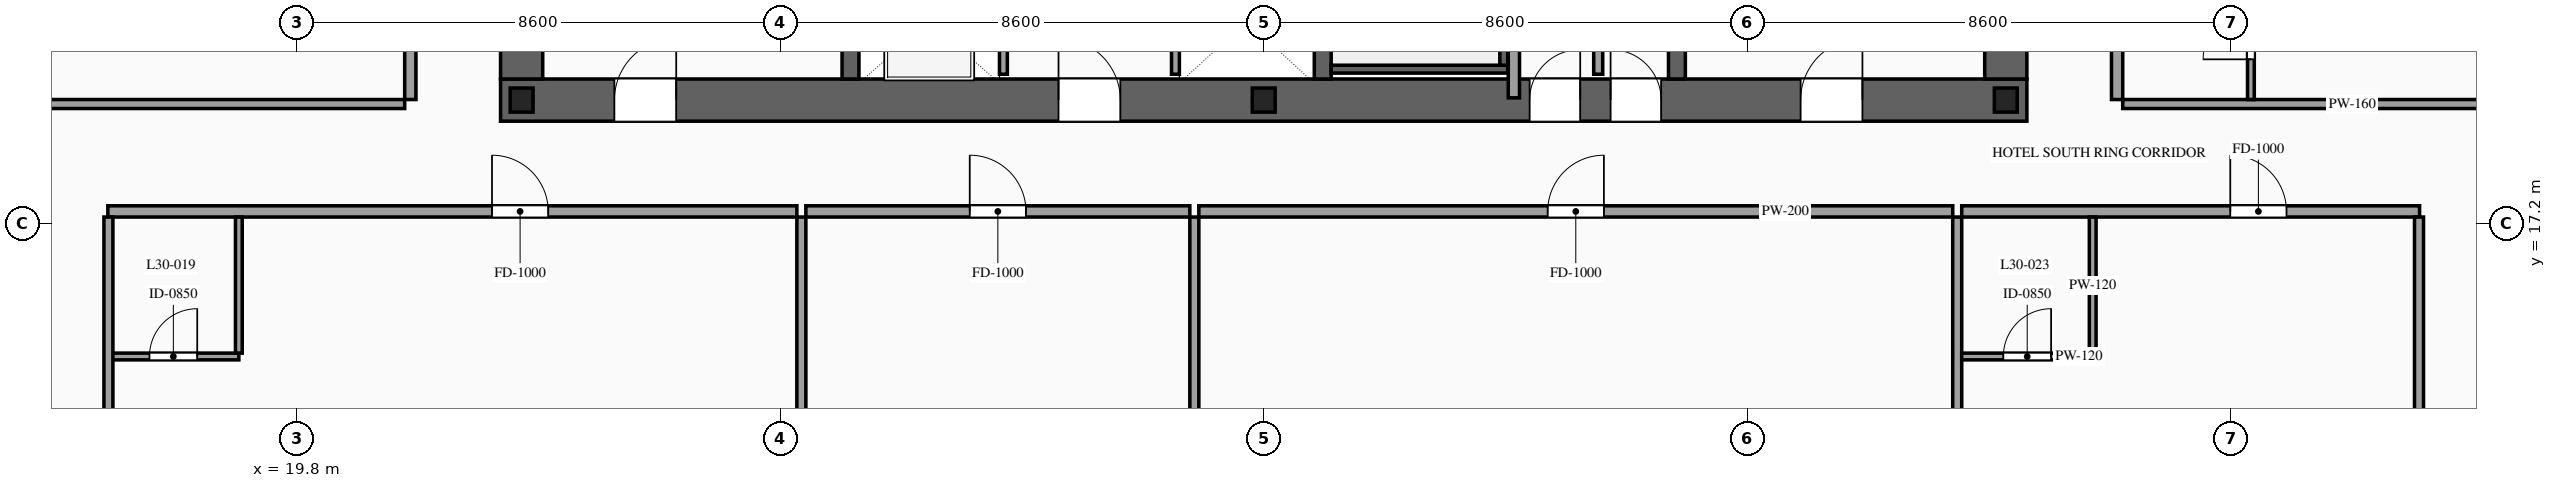
"""IFC4 building model, lengths in metres.
Left out: names, types, materials, properties, quantities, classifications, styles, units other than length and angle.
Written with IfcOpenShell. Run it as: python <this file> out.ifc"""

import sys

from ifc_helpers import new_model, si_unit, direction, frame, frame_2d, origin, origin_2d, place, context, subcontext, project, spatial, rectangle, i_section, extrude, source, transform, mapped, element, fill, save


model = new_model("IFC4")
c1 = context("Model", 3, precision=1e-05, world=origin(), true_north=direction((0.0, 1.0)))
c2 = subcontext(c1, "Body", "Model", "MODEL_VIEW")
j1 = project(units=[si_unit("LENGTHUNIT", "METRE"), si_unit("PLANEANGLEUNIT", "RADIAN")], contexts=[c1])
p1 = place(None, origin())
s1 = spatial("IfcSite", under=j1, at=p1, CompositionType="ELEMENT")
p2 = place(p1, origin())
s2 = spatial("IfcBuilding", under=s1, at=p2, CompositionType="ELEMENT")
p3 = place(p2, frame((0.0, 0.0, 115.4)))
s3 = spatial("IfcBuildingStorey", under=s2, at=p3, CompositionType="ELEMENT", Elevation=115.4)
p4 = place(p3, frame((23.425, 19.4, 0.0), z_axis=(0.0, 0.0, 1.0), x_axis=(1.0, 0.0, 0.0)))
e1 = element("IfcWall", 1, at=p4, inside=s3, PredefinedType="SHEAR", context=c2, shape_type="SweptSolid", body=[
    extrude(rectangle(XDim=27.15, YDim=0.75, at=frame_2d((13.575, 0.0))), origin(), (0.0, 0.0, 1.0), 3.6),
])
p5 = place(p4, frame((2.025, 0.0, 0.0)))
e2 = element("IfcOpeningElement", 2, at=p5, cuts=e1, PredefinedType="OPENING", context=c2, shape_type="SweptSolid", body=[
    extrude(rectangle(XDim=1.1, YDim=2.2, at=frame_2d((0.55, 1.1))), frame((0.0, 0.39, 0.0), z_axis=(0.0, -1.0, 0.0), x_axis=(1.0, 0.0, 0.0)), (0.0, 0.0, 1.0), 0.78),
])
p6 = place(p4, frame((9.925, 0.0, 0.0)))
e3 = element("IfcOpeningElement", 3, at=p6, cuts=e1, PredefinedType="OPENING", context=c2, shape_type="SweptSolid", body=[
    extrude(rectangle(XDim=1.1, YDim=2.2, at=frame_2d((0.55, 1.1))), frame((0.0, 0.39, 0.0), z_axis=(0.0, -1.0, 0.0), x_axis=(1.0, 0.0, 0.0)), (0.0, 0.0, 1.0), 0.78),
])
p7 = place(p4, frame((23.125, 0.0, 0.0)))
e4 = element("IfcOpeningElement", 4, at=p7, cuts=e1, PredefinedType="OPENING", context=c2, shape_type="SweptSolid", body=[
    extrude(rectangle(XDim=1.1, YDim=2.2, at=frame_2d((0.55, 1.1))), frame((0.0, 0.39, 0.0), z_axis=(0.0, -1.0, 0.0), x_axis=(1.0, 0.0, 0.0)), (0.0, 0.0, 1.0), 0.78),
])
p8 = place(p4, frame((19.745, 0.0, 0.0)))
e5 = element("IfcOpeningElement", 5, at=p8, cuts=e1, PredefinedType="OPENING", context=c2, shape_type="SweptSolid", body=[
    extrude(rectangle(XDim=0.9, YDim=2.15, at=frame_2d((0.45, 1.075))), frame((0.0, 0.39, 0.0), z_axis=(0.0, -1.0, 0.0), x_axis=(1.0, 0.0, 0.0)), (0.0, 0.0, 1.0), 0.78),
])
p9 = place(p4, frame((18.305, 0.0, 0.0)))
e6 = element("IfcOpeningElement", 6, at=p9, cuts=e1, PredefinedType="OPENING", context=c2, shape_type="SweptSolid", body=[
    extrude(rectangle(XDim=0.9, YDim=2.15, at=frame_2d((0.45, 1.075))), frame((0.0, 0.39, 0.0), z_axis=(0.0, -1.0, 0.0), x_axis=(1.0, 0.0, 0.0)), (0.0, 0.0, 1.0), 0.78),
])
m1 = source(origin(), c2, "Body", "SweptSolid", [
    extrude(rectangle(XDim=12.05, YDim=0.75, at=frame_2d((6.025, 0.0))), origin(), (0.0, 0.0, 1.0), 3.6),
])
for number, where, z_axis, x_axis in (
    (7, (23.8, 19.775, 0.0), (0.0, 0.0, 1.0), (0.0, 1.0, 0.0)),
    (8, (50.2, 19.775, 0.0), (0.0, 0.0, 1.0), (0.0, 1.0, 0.0)),
):
    element("IfcWall", number, at=place(p3, frame(where, z_axis=z_axis, x_axis=x_axis)), inside=s3, PredefinedType="SHEAR", context=c2, shape_type="MappedRepresentation", body=[
        mapped(m1, transform((0.0, 0.0, 0.0), scale=1.0)),
    ])
m2 = source(origin(), c2, "Body", "SweptSolid", [
    extrude(rectangle(XDim=12.05, YDim=0.3, at=frame_2d((6.025, 0.0))), origin(), (0.0, 0.0, 1.0), 3.6),
])
for number, where, z_axis, x_axis in (
    (9, (29.65, 19.775, 0.0), (0.0, 0.0, 1.0), (0.0, 1.0, 0.0)),
    (10, (38.05, 19.775, 0.0), (0.0, 0.0, 1.0), (0.0, 1.0, 0.0)),
    (11, (44.35, 19.775, 0.0), (0.0, 0.0, 1.0), (0.0, 1.0, 0.0)),
):
    element("IfcWall", number, at=place(p3, frame(where, z_axis=z_axis, x_axis=x_axis)), inside=s3, PredefinedType="SOLIDWALL", context=c2, shape_type="MappedRepresentation", body=[
        mapped(m2, transform((0.0, 0.0, 0.0), scale=1.0)),
    ])
m3 = source(origin(), c2, "Body", "SweptSolid", [
    extrude(i_section(OverallWidth=0.407, OverallDepth=0.428, WebThickness=0.02, FlangeThickness=0.035, at=origin_2d()), origin(), (0.0, 0.0, 1.0), 3.6),
])
for number, where, z_axis, x_axis in (
    (12, (23.8, 19.4, 0.0), (0.0, 0.0, 1.0), (1.0, 0.0, 0.0)),
    (13, (37.0, 19.4, 0.0), (0.0, 0.0, 1.0), (1.0, 0.0, 0.0)),
    (14, (50.2, 19.4, 0.0), (0.0, 0.0, 1.0), (1.0, 0.0, 0.0)),
):
    element("IfcColumn", number, at=place(p3, frame(where, z_axis=z_axis, x_axis=x_axis)), inside=s3, PredefinedType="COLUMN", context=c2, shape_type="MappedRepresentation", body=[
        mapped(m3, transform((0.0, 0.0, 0.0), scale=1.0)),
    ])
p10 = place(p3, frame((32.37, 19.86, 0.0), z_axis=(0.0, 0.0, 1.0), x_axis=(0.0, 1.0, 0.0)))
e15 = element("IfcWall", 15, at=p10, inside=s3, PredefinedType="SOLIDWALL", context=c2, shape_type="SweptSolid", body=[
    extrude(rectangle(XDim=2.04, YDim=0.14, at=frame_2d((1.02, 0.0))), origin(), (0.0, 0.0, 1.0), 3.38),
])
p11 = place(p10, frame((0.47, 0.0, 0.0)))
e16 = element("IfcOpeningElement", 16, at=p11, cuts=e15, PredefinedType="OPENING", context=c2, shape_type="SweptSolid", body=[
    extrude(rectangle(XDim=1.1, YDim=2.2, at=frame_2d((0.55, 1.1))), frame((0.0, 0.085, 0.0), z_axis=(0.0, -1.0, 0.0), x_axis=(1.0, 0.0, 0.0)), (0.0, 0.0, 1.0), 0.17),
])
m4 = source(origin(), c2, "Body", "SweptSolid", [
    extrude(rectangle(XDim=2.04, YDim=0.14, at=frame_2d((1.02, 0.0))), origin(), (0.0, 0.0, 1.0), 3.38),
])
p12 = place(p3, frame((35.43, 19.86, 0.0), z_axis=(0.0, 0.0, 1.0), x_axis=(0.0, 1.0, 0.0)))
e17 = element("IfcWall", 17, at=p12, inside=s3, PredefinedType="SOLIDWALL", context=c2, shape_type="MappedRepresentation", body=[
    mapped(m4, transform((0.0, 0.0, 0.0), scale=1.0)),
])
m5 = source(origin(), c2, "Body", "SweptSolid", [
    extrude(rectangle(XDim=3.14, YDim=0.14, at=frame_2d((1.57, 0.0))), origin(), (0.0, 0.0, 1.0), 3.38),
])
p13 = place(p3, frame((38.2, 19.95, 0.0), z_axis=(0.0, 0.0, 1.0), x_axis=(1.0, 0.0, 0.0)))
e18 = element("IfcWall", 18, at=p13, inside=s3, PredefinedType="SOLIDWALL", context=c2, shape_type="MappedRepresentation", body=[
    mapped(m5, transform((0.0, 0.0, 0.0), scale=1.0)),
])
m6 = source(origin(), c2, "Body", "SweptSolid", [
    extrude(rectangle(XDim=8.94, YDim=0.14, at=frame_2d((4.47, 0.0))), origin(), (0.0, 0.0, 1.0), 3.38),
])
p14 = place(p3, frame((41.27, 20.02, 0.0), z_axis=(0.0, 0.0, 1.0), x_axis=(0.0, 1.0, 0.0)))
e19 = element("IfcWall", 19, at=p14, inside=s3, PredefinedType="SOLIDWALL", context=c2, shape_type="MappedRepresentation", body=[
    mapped(m6, transform((0.0, 0.0, 0.0), scale=1.0)),
])
m7 = source(origin(), c2, "Body", "SweptSolid", [
    extrude(rectangle(XDim=1.34, YDim=0.16, at=frame_2d((0.67, 0.0))), origin(), (0.0, 0.0, 1.0), 3.38),
])
p15 = place(p3, frame((42.95, 19.86, 0.0), z_axis=(0.0, 0.0, 1.0), x_axis=(0.0, 1.0, 0.0)))
e20 = element("IfcWall", 20, at=p15, inside=s3, PredefinedType="PARTITIONING", context=c2, shape_type="MappedRepresentation", body=[
    mapped(m7, transform((0.0, 0.0, 0.0), scale=1.0)),
])
m8 = source(origin(), c2, "Body", "SweptSolid", [
    extrude(rectangle(XDim=6.51, YDim=0.2, at=frame_2d((3.255, 0.0))), origin(), (0.0, 0.0, 1.0), 3.38),
])
p16 = place(p3, frame((41.45, 19.44, 0.0), z_axis=(0.0, 0.0, 1.0), x_axis=(0.0, 1.0, 0.0)))
e21 = element("IfcWall", 21, at=p16, inside=s3, PredefinedType="PARTITIONING", context=c2, shape_type="MappedRepresentation", body=[
    mapped(m8, transform((0.0, 0.0, 0.0), scale=1.0)),
])
p17 = place(p3, frame((16.44, 17.42, 0.0), z_axis=(0.0, 0.0, 1.0), x_axis=(1.0, 0.0, 0.0)))
e22 = element("IfcWall", 22, at=p17, inside=s3, PredefinedType="PARTITIONING", context=c2, shape_type="SweptSolid", body=[
    extrude(rectangle(XDim=12.256, YDim=0.2, at=frame_2d((6.128, 0.0))), origin(), (0.0, 0.0, 1.0), 3.38),
])
p18 = place(p17, frame((6.833, 0.0, 0.0)))
e23 = element("IfcOpeningElement", 23, at=p18, cuts=e22, PredefinedType="OPENING", context=c2, shape_type="SweptSolid", body=[
    extrude(rectangle(XDim=1.0, YDim=2.2, at=frame_2d((0.5, 1.1))), frame((0.0, 0.115, 0.0), z_axis=(0.0, -1.0, 0.0), x_axis=(1.0, 0.0, 0.0)), (0.0, 0.0, 1.0), 0.23),
])
m9 = source(origin(), c2, "Body", "SweptSolid", [
    extrude(rectangle(XDim=14.97, YDim=0.16, at=frame_2d((7.485, 0.0))), origin(), (0.0, 0.0, 1.0), 3.38),
])
p19 = place(p3, frame((28.776, 2.35, 0.0), z_axis=(0.0, 0.0, 1.0), x_axis=(0.0, 1.0, 0.0)))
e24 = element("IfcWall", 24, at=p19, inside=s3, PredefinedType="PARTITIONING", context=c2, shape_type="MappedRepresentation", body=[
    mapped(m9, transform((0.0, 0.0, 0.0), scale=1.0)),
])
p20 = place(p3, frame((16.44, 14.84, 0.0), z_axis=(0.0, 0.0, 1.0), x_axis=(1.0, 0.0, 0.0)))
e25 = element("IfcWall", 25, at=p20, inside=s3, PredefinedType="PARTITIONING", context=c2, shape_type="SweptSolid", body=[
    extrude(rectangle(XDim=2.33, YDim=0.12, at=frame_2d((1.165, 0.0))), origin(), (0.0, 0.0, 1.0), 3.38),
])
p21 = place(p20, frame((0.74, 0.0, 0.0)))
e26 = element("IfcOpeningElement", 26, at=p21, cuts=e25, PredefinedType="OPENING", context=c2, shape_type="SweptSolid", body=[
    extrude(rectangle(XDim=0.85, YDim=2.1, at=frame_2d((0.425, 1.05))), frame((0.0, 0.075, 0.0), z_axis=(0.0, -1.0, 0.0), x_axis=(1.0, 0.0, 0.0)), (0.0, 0.0, 1.0), 0.15),
])
m10 = source(origin(), c2, "Body", "SweptSolid", [
    extrude(rectangle(XDim=2.42, YDim=0.12, at=frame_2d((1.21, 0.0))), origin(), (0.0, 0.0, 1.0), 3.38),
])
p22 = place(p3, frame((18.77, 14.9, 0.0), z_axis=(0.0, 0.0, 1.0), x_axis=(0.0, 1.0, 0.0)))
e27 = element("IfcWall", 27, at=p22, inside=s3, PredefinedType="PARTITIONING", context=c2, shape_type="MappedRepresentation", body=[
    mapped(m10, transform((0.0, 0.0, 0.0), scale=1.0)),
])
p23 = place(p3, frame((28.856, 17.42, 0.0), z_axis=(0.0, 0.0, 1.0), x_axis=(1.0, 0.0, 0.0)))
e28 = element("IfcWall", 28, at=p23, inside=s3, PredefinedType="PARTITIONING", context=c2, shape_type="SweptSolid", body=[
    extrude(rectangle(XDim=6.83, YDim=0.2, at=frame_2d((3.415, 0.0))), origin(), (0.0, 0.0, 1.0), 3.38),
])
p24 = place(p23, frame((2.915, 0.0, 0.0)))
e29 = element("IfcOpeningElement", 29, at=p24, cuts=e28, PredefinedType="OPENING", context=c2, shape_type="SweptSolid", body=[
    extrude(rectangle(XDim=1.0, YDim=2.2, at=frame_2d((0.5, 1.1))), frame((0.0, 0.115, 0.0), z_axis=(0.0, -1.0, 0.0), x_axis=(1.0, 0.0, 0.0)), (0.0, 0.0, 1.0), 0.23),
])
p25 = place(p3, frame((35.766, 2.35, 0.0), z_axis=(0.0, 0.0, 1.0), x_axis=(0.0, 1.0, 0.0)))
e30 = element("IfcWall", 30, at=p25, inside=s3, PredefinedType="PARTITIONING", context=c2, shape_type="MappedRepresentation", body=[
    mapped(m9, transform((0.0, 0.0, 0.0), scale=1.0)),
])
p26 = place(p3, frame((35.846, 17.42, 0.0), z_axis=(0.0, 0.0, 1.0), x_axis=(1.0, 0.0, 0.0)))
e31 = element("IfcWall", 31, at=p26, inside=s3, PredefinedType="PARTITIONING", context=c2, shape_type="SweptSolid", body=[
    extrude(rectangle(XDim=13.41, YDim=0.2, at=frame_2d((6.705, 0.0))), origin(), (0.0, 0.0, 1.0), 3.38),
])
p27 = place(p26, frame((6.205, 0.0, 0.0)))
e32 = element("IfcOpeningElement", 32, at=p27, cuts=e31, PredefinedType="OPENING", context=c2, shape_type="SweptSolid", body=[
    extrude(rectangle(XDim=1.0, YDim=2.2, at=frame_2d((0.5, 1.1))), frame((0.0, 0.115, 0.0), z_axis=(0.0, -1.0, 0.0), x_axis=(1.0, 0.0, 0.0)), (0.0, 0.0, 1.0), 0.23),
])
p28 = place(p3, frame((49.336, 2.35, 0.0), z_axis=(0.0, 0.0, 1.0), x_axis=(0.0, 1.0, 0.0)))
e33 = element("IfcWall", 33, at=p28, inside=s3, PredefinedType="PARTITIONING", context=c2, shape_type="MappedRepresentation", body=[
    mapped(m9, transform((0.0, 0.0, 0.0), scale=1.0)),
])
p29 = place(p3, frame((49.416, 17.42, 0.0), z_axis=(0.0, 0.0, 1.0), x_axis=(1.0, 0.0, 0.0)))
e34 = element("IfcWall", 34, at=p29, inside=s3, PredefinedType="PARTITIONING", context=c2, shape_type="SweptSolid", body=[
    extrude(rectangle(XDim=8.144, YDim=0.2, at=frame_2d((4.072, 0.0))), origin(), (0.0, 0.0, 1.0), 3.38),
])
p30 = place(p29, frame((4.777, 0.0, 0.0)))
e35 = element("IfcOpeningElement", 35, at=p30, cuts=e34, PredefinedType="OPENING", context=c2, shape_type="SweptSolid", body=[
    extrude(rectangle(XDim=1.0, YDim=2.2, at=frame_2d((0.5, 1.1))), frame((0.0, 0.115, 0.0), z_axis=(0.0, -1.0, 0.0), x_axis=(1.0, 0.0, 0.0)), (0.0, 0.0, 1.0), 0.23),
])
m11 = source(origin(), c2, "Body", "SweptSolid", [
    extrude(rectangle(XDim=14.82, YDim=0.16, at=frame_2d((7.41, 0.0))), origin(), (0.0, 0.0, 1.0), 3.38),
])
for number, where, z_axis, x_axis in (
    (36, (16.45, 2.5, 0.0), (0.0, 0.0, 1.0), (0.0, 1.0, 0.0)),
    (37, (57.55, 2.5, 0.0), (0.0, 0.0, 1.0), (0.0, 1.0, 0.0)),
):
    element("IfcWall", number, at=place(p3, frame(where, z_axis=z_axis, x_axis=x_axis)), inside=s3, PredefinedType="PARTITIONING", context=c2, shape_type="MappedRepresentation", body=[
        mapped(m11, transform((0.0, 0.0, 0.0), scale=1.0)),
    ])
p31 = place(p3, frame((49.416, 14.84, 0.0), z_axis=(0.0, 0.0, 1.0), x_axis=(1.0, 0.0, 0.0)))
e38 = element("IfcWall", 38, at=p31, inside=s3, PredefinedType="PARTITIONING", context=c2, shape_type="SweptSolid", body=[
    extrude(rectangle(XDim=2.33, YDim=0.12, at=frame_2d((1.165, 0.0))), origin(), (0.0, 0.0, 1.0), 3.38),
])
p32 = place(p31, frame((0.74, 0.0, 0.0)))
e39 = element("IfcOpeningElement", 39, at=p32, cuts=e38, PredefinedType="OPENING", context=c2, shape_type="SweptSolid", body=[
    extrude(rectangle(XDim=0.85, YDim=2.1, at=frame_2d((0.425, 1.05))), frame((0.0, 0.075, 0.0), z_axis=(0.0, -1.0, 0.0), x_axis=(1.0, 0.0, 0.0)), (0.0, 0.0, 1.0), 0.15),
])
p33 = place(p3, frame((51.746, 14.9, 0.0), z_axis=(0.0, 0.0, 1.0), x_axis=(0.0, 1.0, 0.0)))
e40 = element("IfcWall", 40, at=p33, inside=s3, PredefinedType="PARTITIONING", context=c2, shape_type="MappedRepresentation", body=[
    mapped(m10, transform((0.0, 0.0, 0.0), scale=1.0)),
])
p34 = place(p3, frame((21.82, 19.41, 0.0), z_axis=(0.0, 0.0, 1.0), x_axis=(0.0, 1.0, 0.0)))
e41 = element("IfcWall", 41, at=p34, inside=s3, PredefinedType="PARTITIONING", context=c2, shape_type="SweptSolid", body=[
    extrude(rectangle(XDim=12.78, YDim=0.2, at=frame_2d((6.39, 0.0))), origin(), (0.0, 0.0, 1.0), 3.38),
])
p35 = place(p34, frame((5.89, 0.0, 0.0)))
e42 = element("IfcOpeningElement", 42, at=p35, cuts=e41, PredefinedType="OPENING", context=c2, shape_type="SweptSolid", body=[
    extrude(rectangle(XDim=1.0, YDim=2.2, at=frame_2d((0.5, 1.1))), frame((0.0, 0.115, 0.0), z_axis=(0.0, -1.0, 0.0), x_axis=(1.0, 0.0, 0.0)), (0.0, 0.0, 1.0), 0.23),
])
m12 = source(origin(), c2, "Body", "SweptSolid", [
    extrude(rectangle(XDim=8.17, YDim=0.16, at=frame_2d((4.085, 0.0))), origin(), (0.0, 0.0, 1.0), 2.875),
])
p36 = place(p3, frame((13.55, 19.33, 0.0), z_axis=(0.0, 0.0, 1.0), x_axis=(1.0, 0.0, 0.0)))
e43 = element("IfcWall", 43, at=p36, inside=s3, PredefinedType="PARTITIONING", context=c2, shape_type="MappedRepresentation", body=[
    mapped(m12, transform((0.0, 0.0, 0.0), scale=1.0)),
])
p37 = place(p3, frame((52.18, 19.41, 0.0), z_axis=(0.0, 0.0, 1.0), x_axis=(0.0, 1.0, 0.0)))
e44 = element("IfcWall", 44, at=p37, inside=s3, PredefinedType="PARTITIONING", context=c2, shape_type="SweptSolid", body=[
    extrude(rectangle(XDim=6.31, YDim=0.2, at=frame_2d((3.155, 0.0))), origin(), (0.0, 0.0, 1.0), 3.38),
])
p38 = place(p37, frame((3.835, 0.0, 0.0)))
e45 = element("IfcOpeningElement", 45, at=p38, cuts=e44, PredefinedType="OPENING", context=c2, shape_type="SweptSolid", body=[
    extrude(rectangle(XDim=1.0, YDim=2.2, at=frame_2d((0.5, 1.1))), frame((0.0, 0.115, 0.0), z_axis=(0.0, -1.0, 0.0), x_axis=(1.0, 0.0, 0.0)), (0.0, 0.0, 1.0), 0.23),
])
p39 = place(p3, frame((52.28, 19.33, 0.0), z_axis=(0.0, 0.0, 1.0), x_axis=(1.0, 0.0, 0.0)))
e46 = element("IfcWall", 46, at=p39, inside=s3, PredefinedType="PARTITIONING", context=c2, shape_type="MappedRepresentation", body=[
    mapped(m12, transform((0.0, 0.0, 0.0), scale=1.0)),
])
p40 = place(p3, frame((54.56, 19.41, 0.0), z_axis=(0.0, 0.0, 1.0), x_axis=(0.0, 1.0, 0.0)))
e47 = element("IfcWall", 47, at=p40, inside=s3, PredefinedType="PARTITIONING", context=c2, shape_type="SweptSolid", body=[
    extrude(rectangle(XDim=2.28, YDim=0.12, at=frame_2d((1.14, 0.0))), origin(), (0.0, 0.0, 1.0), 3.38),
])
p41 = place(p40, frame((0.715, 0.0, 0.0)))
e48 = element("IfcOpeningElement", 48, at=p41, cuts=e47, PredefinedType="OPENING", context=c2, shape_type="SweptSolid", body=[
    extrude(rectangle(XDim=0.85, YDim=2.1, at=frame_2d((0.425, 1.05))), frame((0.0, 0.075, 0.0), z_axis=(0.0, -1.0, 0.0), x_axis=(1.0, 0.0, 0.0)), (0.0, 0.0, 1.0), 0.15),
])
m13 = source(origin(), c2, "Body", "SweptSolid", [
    extrude(rectangle(XDim=1.1, YDim=2.2, at=frame_2d((0.55, 1.1))), frame((0.0, 0.025, 0.0), z_axis=(0.0, -1.0, 0.0), x_axis=(1.0, 0.0, 0.0)), (0.0, 0.0, 1.0), 0.05),
])
p42 = place(p5, origin())
e49 = element("IfcDoor", 49, at=p42, inside=s3, OperationType="SINGLE_SWING_RIGHT", PredefinedType="DOOR", context=c2, shape_type="MappedRepresentation", body=[
    mapped(m13, transform((0.0, 0.0, 0.0), scale=1.0)),
])
fill(e2, e49)
p43 = place(p6, origin())
e50 = element("IfcDoor", 50, at=p43, inside=s3, OperationType="SINGLE_SWING_LEFT", PredefinedType="DOOR", context=c2, shape_type="MappedRepresentation", body=[
    mapped(m13, transform((0.0, 0.0, 0.0), scale=1.0)),
])
fill(e3, e50)
p44 = place(p7, origin())
e51 = element("IfcDoor", 51, at=p44, inside=s3, OperationType="SINGLE_SWING_RIGHT", PredefinedType="DOOR", context=c2, shape_type="MappedRepresentation", body=[
    mapped(m13, transform((0.0, 0.0, 0.0), scale=1.0)),
])
fill(e4, e51)
m14 = source(origin(), c2, "Body", "SweptSolid", [
    extrude(rectangle(XDim=0.9, YDim=2.15, at=frame_2d((0.45, 1.075))), frame((0.0, 0.025, 0.0), z_axis=(0.0, -1.0, 0.0), x_axis=(1.0, 0.0, 0.0)), (0.0, 0.0, 1.0), 0.05),
])
p45 = place(p8, origin())
e52 = element("IfcDoor", 52, at=p45, inside=s3, OperationType="SINGLE_SWING_LEFT", PredefinedType="DOOR", context=c2, shape_type="MappedRepresentation", body=[
    mapped(m14, transform((0.0, 0.0, 0.0), scale=1.0)),
])
fill(e5, e52)
p46 = place(p9, origin())
e53 = element("IfcDoor", 53, at=p46, inside=s3, OperationType="SINGLE_SWING_RIGHT", PredefinedType="DOOR", context=c2, shape_type="MappedRepresentation", body=[
    mapped(m14, transform((0.0, 0.0, 0.0), scale=1.0)),
])
fill(e6, e53)
m15 = source(origin(), c2, "Body", "SweptSolid", [
    extrude(rectangle(XDim=1.0, YDim=2.2, at=frame_2d((0.5, 1.1))), frame((0.0, 0.025, 0.0), z_axis=(0.0, -1.0, 0.0), x_axis=(1.0, 0.0, 0.0)), (0.0, 0.0, 1.0), 0.05),
])
p47 = place(p18, origin())
e54 = element("IfcDoor", 54, at=p47, inside=s3, OperationType="SINGLE_SWING_LEFT", PredefinedType="DOOR", context=c2, shape_type="MappedRepresentation", body=[
    mapped(m15, transform((0.0, 0.0, 0.0), scale=1.0)),
])
fill(e23, e54)
m16 = source(origin(), c2, "Body", "SweptSolid", [
    extrude(rectangle(XDim=0.85, YDim=2.1, at=frame_2d((0.425, 1.05))), frame((0.0, 0.025, 0.0), z_axis=(0.0, -1.0, 0.0), x_axis=(1.0, 0.0, 0.0)), (0.0, 0.0, 1.0), 0.05),
])
p48 = place(p21, origin())
e55 = element("IfcDoor", 55, at=p48, inside=s3, OperationType="SINGLE_SWING_RIGHT", PredefinedType="DOOR", context=c2, shape_type="MappedRepresentation", body=[
    mapped(m16, transform((0.0, 0.0, 0.0), scale=1.0)),
])
fill(e26, e55)
p49 = place(p24, origin())
e56 = element("IfcDoor", 56, at=p49, inside=s3, OperationType="SINGLE_SWING_LEFT", PredefinedType="DOOR", context=c2, shape_type="MappedRepresentation", body=[
    mapped(m15, transform((0.0, 0.0, 0.0), scale=1.0)),
])
fill(e29, e56)
p50 = place(p27, origin())
e57 = element("IfcDoor", 57, at=p50, inside=s3, OperationType="SINGLE_SWING_RIGHT", PredefinedType="DOOR", context=c2, shape_type="MappedRepresentation", body=[
    mapped(m15, transform((0.0, 0.0, 0.0), scale=1.0)),
])
fill(e32, e57)
p51 = place(p30, origin())
e58 = element("IfcDoor", 58, at=p51, inside=s3, OperationType="SINGLE_SWING_LEFT", PredefinedType="DOOR", context=c2, shape_type="MappedRepresentation", body=[
    mapped(m15, transform((0.0, 0.0, 0.0), scale=1.0)),
])
fill(e35, e58)
p52 = place(p32, origin())
e59 = element("IfcDoor", 59, at=p52, inside=s3, OperationType="SINGLE_SWING_RIGHT", PredefinedType="DOOR", context=c2, shape_type="MappedRepresentation", body=[
    mapped(m16, transform((0.0, 0.0, 0.0), scale=1.0)),
])
fill(e39, e59)
p53 = place(p41, origin())
e60 = element("IfcDoor", 60, at=p53, inside=s3, OperationType="SINGLE_SWING_LEFT", PredefinedType="DOOR", context=c2, shape_type="MappedRepresentation", body=[
    mapped(m16, transform((0.0, 0.0, 0.0), scale=1.0)),
])
fill(e48, e60)
save(model, sys.argv[1])
